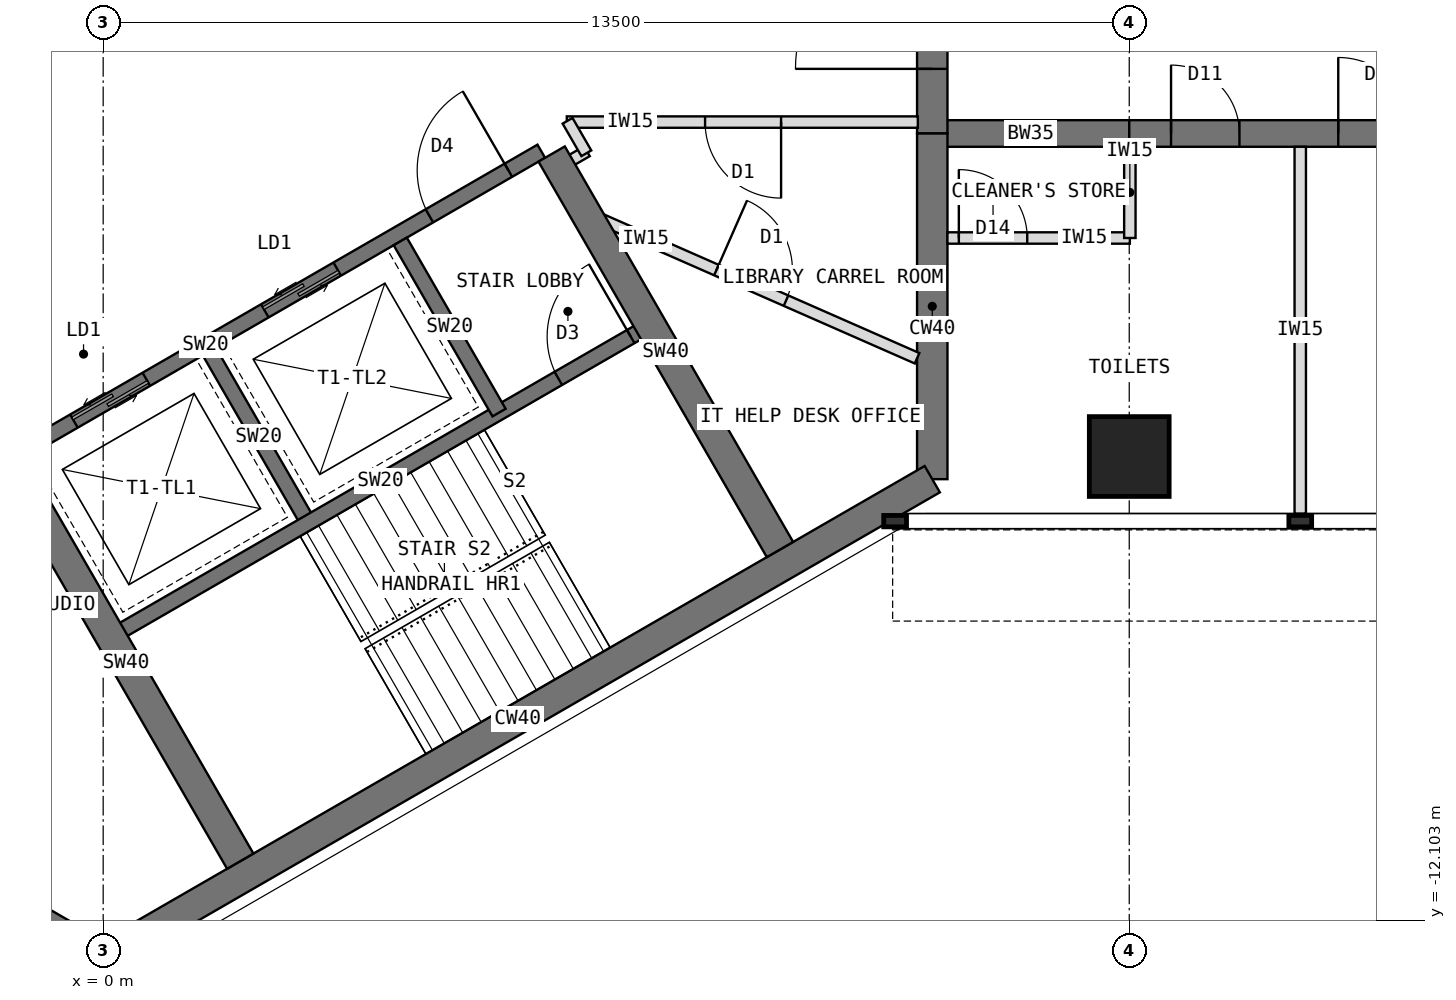
"""IFC4 building model, lengths in metres.
Left out: names, types, materials, properties, quantities, classifications, styles, units other than length and angle.
Written with IfcOpenShell. Run it as: python <this file> out.ifc"""

import sys

from ifc_helpers import new_model, si_unit, direction, frame, frame_2d, origin, origin_2d, place, context, subcontext, project, spatial, rectangle, extrude, element, fill, save


model = new_model("IFC4")
c1 = context("Model", 3, precision=1e-05, world=origin(), true_north=direction((0.0, 1.0)))
c2 = subcontext(c1, "Body", "Model", "MODEL_VIEW")
j1 = project(units=[si_unit("LENGTHUNIT", "METRE"), si_unit("PLANEANGLEUNIT", "RADIAN")], contexts=[c1])
p1 = place(None, origin())
s1 = spatial("IfcSite", under=j1, at=p1, CompositionType="ELEMENT")
p2 = place(p1, origin())
s2 = spatial("IfcBuilding", under=s1, at=p2, CompositionType="ELEMENT")
p3 = place(p2, frame((0.0, 0.0, 251.5)))
s3 = spatial("IfcBuildingStorey", under=s2, at=p3, CompositionType="ELEMENT", Elevation=251.5)
p4 = place(p3, frame((10.908, -6.298, 0.0), z_axis=(0.0, 0.0, 1.0), x_axis=(0.0, 1.0, 0.0)))
e1 = element("IfcWall", 1, at=p4, inside=s3, PredefinedType="SHEAR", context=c2, shape_type="SweptSolid", body=[
    extrude(rectangle(XDim=4.548, YDim=0.4, at=frame_2d((2.274, 0.0))), origin(), (0.0, 0.0, 1.0), 4.0),
])
p5 = place(p3, frame((10.908, -1.75, 0.0), z_axis=(0.0, 0.0, 1.0), x_axis=(0.0, 1.0, 0.0)))
e2 = element("IfcWall", 2, at=p5, inside=s3, PredefinedType="SHEAR", context=c2, shape_type="SweptSolid", body=[
    extrude(rectangle(XDim=3.5, YDim=0.4, at=frame_2d((1.75, 0.0))), origin(), (0.0, 0.0, 1.0), 4.0),
])
p6 = place(p5, frame((0.85, 0.0, 0.0)))
e3 = element("IfcOpeningElement", 3, at=p6, cuts=e2, PredefinedType="OPENING", context=c2, shape_type="SweptSolid", body=[
    extrude(rectangle(XDim=1.8, YDim=2.1, at=frame_2d((0.9, 1.05))), frame((0.0, 0.21, 0.0), z_axis=(0.0, -1.0, 0.0), x_axis=(1.0, 0.0, 0.0)), (0.0, 0.0, 1.0), 0.42),
])
p7 = place(p3, frame((-3.939, -10.322, 0.0), z_axis=(0.0, 0.0, 1.0), x_axis=(0.866011268655, -0.500024481964, 0.0)))
e4 = element("IfcWall", 4, at=p7, inside=s3, PredefinedType="SHEAR", context=c2, shape_type="SweptSolid", body=[
    extrude(rectangle(XDim=4.548, YDim=0.4, at=frame_2d((2.274, 0.0))), origin(), (0.0, 0.0, 1.0), 4.0),
])
p8 = place(p3, frame((0.0, -12.596, 0.0), z_axis=(0.0, 0.0, 1.0), x_axis=(0.866021940709, 0.500005998175, 0.0)))
e5 = element("IfcWall", 5, at=p8, inside=s3, PredefinedType="SHEAR", context=c2, shape_type="SweptSolid", body=[
    extrude(rectangle(XDim=12.596, YDim=0.4, at=frame_2d((6.298, 0.0))), origin(), (0.0, 0.0, 1.0), 4.0),
])
p9 = place(p3, frame((10.908, -1.75, 0.0), z_axis=(0.0, 0.0, 1.0), x_axis=(1.0, 0.0, 0.0)))
e6 = element("IfcWall", 6, at=p9, inside=s3, PredefinedType="SHEAR", context=c2, shape_type="SweptSolid", body=[
    extrude(rectangle(XDim=2.592, YDim=0.35, at=frame_2d((1.296, 0.0))), origin(), (0.0, 0.0, 1.0), 4.0),
])
p10 = place(p3, frame((13.5, -1.75, 0.0), z_axis=(0.0, 0.0, 1.0), x_axis=(1.0, 0.0, 0.0)))
e7 = element("IfcWall", 7, at=p10, inside=s3, PredefinedType="SHEAR", context=c2, shape_type="SweptSolid", body=[
    extrude(rectangle(XDim=13.2, YDim=0.35, at=frame_2d((6.6, 0.0))), origin(), (0.0, 0.0, 1.0), 4.0),
])
p11 = place(p10, frame((0.55, 0.0, 0.0)))
e8 = element("IfcOpeningElement", 8, at=p11, cuts=e7, PredefinedType="OPENING", context=c2, shape_type="SweptSolid", body=[
    extrude(rectangle(XDim=0.9, YDim=2.1, at=frame_2d((0.45, 1.05))), frame((0.0, 0.185, 0.0), z_axis=(0.0, -1.0, 0.0), x_axis=(1.0, 0.0, 0.0)), (0.0, 0.0, 1.0), 0.37),
])
p12 = place(p10, frame((2.75, 0.0, 0.0)))
e9 = element("IfcOpeningElement", 9, at=p12, cuts=e7, PredefinedType="OPENING", context=c2, shape_type="SweptSolid", body=[
    extrude(rectangle(XDim=1.0, YDim=2.1, at=frame_2d((0.5, 1.05))), frame((0.0, 0.185, 0.0), z_axis=(0.0, -1.0, 0.0), x_axis=(1.0, 0.0, 0.0)), (0.0, 0.0, 1.0), 0.37),
])
p13 = place(p10, frame((7.25, 0.0, 0.0)))
e10 = element("IfcOpeningElement", 10, at=p13, cuts=e7, PredefinedType="OPENING", context=c2, shape_type="SweptSolid", body=[
    extrude(rectangle(XDim=1.0, YDim=2.1, at=frame_2d((0.5, 1.05))), frame((0.0, 0.185, 0.0), z_axis=(0.0, -1.0, 0.0), x_axis=(1.0, 0.0, 0.0)), (0.0, 0.0, 1.0), 0.37),
])
p14 = place(p3, frame((13.5, -6.0, 0.0), z_axis=(0.0, 0.0, 1.0), x_axis=(1.0, 0.0, 0.0)))
e11 = element("IfcColumn", 11, at=p14, inside=s3, PredefinedType="COLUMN", context=c2, shape_type="SweptSolid", body=[
    extrude(rectangle(XDim=1.05, YDim=1.05, at=origin_2d()), origin(), (0.0, 0.0, 1.0), 4.0),
])
p15 = place(p3, frame((-1.164, -5.984, 0.0), z_axis=(0.0, 0.0, 1.0), x_axis=(0.866026010844, 0.49999894854, 0.0)))
e12 = element("IfcWall", 12, at=p15, inside=s3, PredefinedType="SHEAR", context=c2, shape_type="SweptSolid", body=[
    extrude(rectangle(XDim=8.0, YDim=0.2, at=frame_2d((4.0, 0.0))), origin(), (0.0, 0.0, 1.0), 4.0),
])
p16 = place(p15, frame((6.3, 0.0, 0.0)))
e13 = element("IfcOpeningElement", 13, at=p16, cuts=e12, PredefinedType="OPENING", context=c2, shape_type="SweptSolid", body=[
    extrude(rectangle(XDim=1.2, YDim=2.1, at=frame_2d((0.6, 1.05))), frame((0.0, 0.11, 0.0), z_axis=(0.0, -1.0, 0.0), x_axis=(1.0, 0.0, 0.0)), (0.0, 0.0, 1.0), 0.22),
])
p17 = place(p15, frame((0.9, 0.0, 0.0)))
e14 = element("IfcOpeningElement", 14, at=p17, cuts=e12, PredefinedType="OPENING", context=c2, shape_type="SweptSolid", body=[
    extrude(rectangle(XDim=1.1, YDim=2.2, at=frame_2d((0.55, 1.1))), frame((0.0, 0.11, 0.0), z_axis=(0.0, -1.0, 0.0), x_axis=(1.0, 0.0, 0.0)), (0.0, 0.0, 1.0), 0.22),
])
p18 = place(p15, frame((3.8, 0.0, 0.0)))
e15 = element("IfcOpeningElement", 15, at=p18, cuts=e12, PredefinedType="OPENING", context=c2, shape_type="SweptSolid", body=[
    extrude(rectangle(XDim=1.1, YDim=2.2, at=frame_2d((0.55, 1.1))), frame((0.0, 0.11, 0.0), z_axis=(0.0, -1.0, 0.0), x_axis=(1.0, 0.0, 0.0)), (0.0, 0.0, 1.0), 0.22),
])
p19 = place(p3, frame((1.397, -4.62, 0.0), z_axis=(0.0, 0.0, 1.0), x_axis=(0.499936506574, -0.866062058628, 0.0)))
e16 = element("IfcWall", 16, at=p19, inside=s3, PredefinedType="SHEAR", context=c2, shape_type="SweptSolid", body=[
    extrude(rectangle(XDim=2.6, YDim=0.2, at=frame_2d((1.3, 0.0))), origin(), (0.0, 0.0, 1.0), 4.0),
])
p20 = place(p3, frame((3.909, -3.17, 0.0), z_axis=(0.0, 0.0, 1.0), x_axis=(0.49997716683, -0.86603858612, 0.0)))
e17 = element("IfcWall", 17, at=p20, inside=s3, PredefinedType="SHEAR", context=c2, shape_type="SweptSolid", body=[
    extrude(rectangle(XDim=2.6, YDim=0.2, at=frame_2d((1.3, 0.0))), origin(), (0.0, 0.0, 1.0), 4.0),
])
p21 = place(p3, frame((0.186, -8.322, 0.0), z_axis=(0.0, 0.0, 1.0), x_axis=(0.866026010844, 0.49999894854, 0.0)))
e18 = element("IfcWall", 18, at=p21, inside=s3, PredefinedType="SHEAR", context=c2, shape_type="SweptSolid", body=[
    extrude(rectangle(XDim=8.0, YDim=0.2, at=frame_2d((4.0, 0.0))), origin(), (0.0, 0.0, 1.0), 4.0),
])
p22 = place(p21, frame((6.7, 0.0, 0.0)))
e19 = element("IfcOpeningElement", 19, at=p22, cuts=e18, PredefinedType="OPENING", context=c2, shape_type="SweptSolid", body=[
    extrude(rectangle(XDim=1.1, YDim=2.1, at=frame_2d((0.55, 1.05))), frame((0.0, 0.11, 0.0), z_axis=(0.0, -1.0, 0.0), x_axis=(1.0, 0.0, 0.0)), (0.0, 0.0, 1.0), 0.22),
])
for number, where, z_axis, x_axis in (
    (20, (5.901, -2.02, 0.0), (0.0, 0.0, 1.0), (0.5, -0.866, 0.0)),
    (21, (-1.201, -6.12, 0.0), (0.0, 0.0, 1.0), (0.5, -0.866, 0.0)),
):
    element("IfcWall", number, at=place(p3, frame(where, z_axis=z_axis, x_axis=x_axis)), inside=s3, PredefinedType="SHEAR", context=c2, shape_type="SweptSolid", body=[
        extrude(rectangle(XDim=6.008, YDim=0.4, at=frame_2d((3.004, 0.0))), origin(), (0.0, 0.0, 1.0), 4.0),
    ])
p23 = place(p3, frame((15.75, -1.925, 0.0), z_axis=(0.0, 0.0, 1.0), x_axis=(0.0, -1.0, 0.0)))
e22 = element("IfcWall", 22, at=p23, inside=s3, PredefinedType="PARTITIONING", context=c2, shape_type="SweptSolid", body=[
    extrude(rectangle(XDim=4.825, YDim=0.15, at=frame_2d((2.413, 0.0))), origin(), (0.0, 0.0, 1.0), 3.8),
])
p24 = place(p3, frame((11.108, -3.125, 0.0), z_axis=(0.0, 0.0, 1.0), x_axis=(1.0, 0.0, 0.0)))
e23 = element("IfcWall", 23, at=p24, inside=s3, PredefinedType="PARTITIONING", context=c2, shape_type="SweptSolid", body=[
    extrude(rectangle(XDim=2.4, YDim=0.15, at=frame_2d((1.2, 0.0))), origin(), (0.0, 0.0, 1.0), 3.8),
])
p25 = place(p24, frame((0.15, 0.0, 0.0)))
e24 = element("IfcOpeningElement", 24, at=p25, cuts=e23, PredefinedType="OPENING", context=c2, shape_type="SweptSolid", body=[
    extrude(rectangle(XDim=0.9, YDim=2.1, at=frame_2d((0.45, 1.05))), frame((0.0, 0.085, 0.0), z_axis=(0.0, -1.0, 0.0), x_axis=(1.0, 0.0, 0.0)), (0.0, 0.0, 1.0), 0.17),
])
p26 = place(p3, frame((13.508, -1.925, 0.0), z_axis=(0.0, 0.0, 1.0), x_axis=(0.0, -1.0, 0.0)))
e25 = element("IfcWall", 25, at=p26, inside=s3, PredefinedType="PARTITIONING", context=c2, shape_type="SweptSolid", body=[
    extrude(rectangle(XDim=1.2, YDim=0.15, at=frame_2d((0.6, 0.0))), origin(), (0.0, 0.0, 1.0), 3.267),
])
p27 = place(p3, frame((6.365, -1.983, 0.0), z_axis=(0.0, 0.0, 1.0), x_axis=(-0.865892400268, -0.500230298122, 0.0)))
e26 = element("IfcWall", 26, at=p27, inside=s3, PredefinedType="PARTITIONING", context=c2, shape_type="SweptSolid", body=[
    extrude(rectangle(XDim=0.43, YDim=0.15, at=frame_2d((0.215, 0.0))), origin(), (0.0, 0.0, 1.0), 3.8),
])
p28 = place(p3, frame((10.718, -1.6, 0.0), z_axis=(0.0, 0.0, 1.0), x_axis=(-1.0, 0.0, 0.0)))
e27 = element("IfcWall", 27, at=p28, inside=s3, PredefinedType="PARTITIONING", context=c2, shape_type="SweptSolid", body=[
    extrude(rectangle(XDim=4.618, YDim=0.15, at=frame_2d((2.309, 0.0))), origin(), (0.0, 0.0, 1.0), 3.8),
])
p29 = place(p28, frame((1.799, 0.0, 0.0)))
e28 = element("IfcOpeningElement", 28, at=p29, cuts=e27, PredefinedType="OPENING", context=c2, shape_type="SweptSolid", body=[
    extrude(rectangle(XDim=1.0, YDim=2.1, at=frame_2d((0.5, 1.05))), frame((0.0, 0.085, 0.0), z_axis=(0.0, -1.0, 0.0), x_axis=(1.0, 0.0, 0.0)), (0.0, 0.0, 1.0), 0.17),
])
p30 = place(p3, frame((6.11, -1.583, 0.0), z_axis=(0.0, 0.0, 1.0), x_axis=(0.50033519877, -0.865831790172, 0.0)))
e29 = element("IfcWall", 29, at=p30, inside=s3, PredefinedType="PARTITIONING", context=c2, shape_type="SweptSolid", body=[
    extrude(rectangle(XDim=0.494, YDim=0.15, at=frame_2d((0.247, 0.0))), origin(), (0.0, 0.0, 1.0), 3.8),
])
p31 = place(p3, frame((6.344, -2.789, 0.0), z_axis=(0.0, 0.0, 1.0), x_axis=(0.915438841787, -0.402457111937, 0.0)))
e30 = element("IfcWall", 30, at=p31, inside=s3, PredefinedType="PARTITIONING", context=c2, shape_type="SweptSolid", body=[
    extrude(rectangle(XDim=4.767, YDim=0.15, at=frame_2d((2.383, 0.0))), origin(), (0.0, 0.0, 1.0), 3.8),
])
p32 = place(p31, frame((1.883, 0.0, 0.0)))
e31 = element("IfcOpeningElement", 31, at=p32, cuts=e30, PredefinedType="OPENING", context=c2, shape_type="SweptSolid", body=[
    extrude(rectangle(XDim=1.0, YDim=2.1, at=frame_2d((0.5, 1.05))), frame((0.0, 0.085, 0.0), z_axis=(0.0, -1.0, 0.0), x_axis=(1.0, 0.0, 0.0)), (0.0, 0.0, 1.0), 0.17),
])
p33 = place(p16, origin())
e32 = element("IfcDoor", 32, at=p33, inside=s3, OperationType="SINGLE_SWING_RIGHT", PredefinedType="DOOR", context=c2, shape_type="SweptSolid", body=[
    extrude(rectangle(XDim=1.2, YDim=2.1, at=frame_2d((0.6, 1.05))), frame((0.0, 0.025, 0.0), z_axis=(0.0, -1.0, 0.0), x_axis=(1.0, 0.0, 0.0)), (0.0, 0.0, 1.0), 0.05),
])
fill(e13, e32)
p34 = place(p17, origin())
e33 = element("IfcDoor", 33, at=p34, inside=s3, OperationType="DOUBLE_DOOR_SLIDING", PredefinedType="DOOR", context=c2, shape_type="SweptSolid", body=[
    extrude(rectangle(XDim=1.1, YDim=2.2, at=frame_2d((0.55, 1.1))), frame((0.0, 0.025, 0.0), z_axis=(0.0, -1.0, 0.0), x_axis=(1.0, 0.0, 0.0)), (0.0, 0.0, 1.0), 0.05),
])
fill(e14, e33)
p35 = place(p18, origin())
e34 = element("IfcDoor", 34, at=p35, inside=s3, OperationType="DOUBLE_DOOR_SLIDING", PredefinedType="DOOR", context=c2, shape_type="SweptSolid", body=[
    extrude(rectangle(XDim=1.1, YDim=2.2, at=frame_2d((0.55, 1.1))), frame((0.0, 0.025, 0.0), z_axis=(0.0, -1.0, 0.0), x_axis=(1.0, 0.0, 0.0)), (0.0, 0.0, 1.0), 0.05),
])
fill(e15, e34)
p36 = place(p22, origin())
e35 = element("IfcDoor", 35, at=p36, inside=s3, OperationType="SINGLE_SWING_RIGHT", PredefinedType="DOOR", context=c2, shape_type="SweptSolid", body=[
    extrude(rectangle(XDim=1.1, YDim=2.1, at=frame_2d((0.55, 1.05))), frame((0.0, 0.025, 0.0), z_axis=(0.0, -1.0, 0.0), x_axis=(1.0, 0.0, 0.0)), (0.0, 0.0, 1.0), 0.05),
])
fill(e19, e35)
p37 = place(p6, origin())
e36 = element("IfcDoor", 36, at=p37, inside=s3, OperationType="DOUBLE_DOOR_DOUBLE_SWING", PredefinedType="DOOR", context=c2, shape_type="SweptSolid", body=[
    extrude(rectangle(XDim=1.8, YDim=2.1, at=frame_2d((0.9, 1.05))), frame((0.0, 0.025, 0.0), z_axis=(0.0, -1.0, 0.0), x_axis=(1.0, 0.0, 0.0)), (0.0, 0.0, 1.0), 0.05),
])
fill(e3, e36)
p38 = place(p25, origin())
e37 = element("IfcDoor", 37, at=p38, inside=s3, OperationType="SINGLE_SWING_LEFT", PredefinedType="DOOR", context=c2, shape_type="SweptSolid", body=[
    extrude(rectangle(XDim=0.9, YDim=2.1, at=frame_2d((0.45, 1.05))), frame((0.0, 0.025, 0.0), z_axis=(0.0, -1.0, 0.0), x_axis=(1.0, 0.0, 0.0)), (0.0, 0.0, 1.0), 0.05),
])
fill(e24, e37)
p39 = place(p29, origin())
e38 = element("IfcDoor", 38, at=p39, inside=s3, OperationType="SINGLE_SWING_LEFT", PredefinedType="DOOR", context=c2, shape_type="SweptSolid", body=[
    extrude(rectangle(XDim=1.0, YDim=2.1, at=frame_2d((0.5, 1.05))), frame((0.0, 0.025, 0.0), z_axis=(0.0, -1.0, 0.0), x_axis=(1.0, 0.0, 0.0)), (0.0, 0.0, 1.0), 0.05),
])
fill(e28, e38)
p40 = place(p32, origin())
e39 = element("IfcDoor", 39, at=p40, inside=s3, OperationType="SINGLE_SWING_LEFT", PredefinedType="DOOR", context=c2, shape_type="SweptSolid", body=[
    extrude(rectangle(XDim=1.0, YDim=2.1, at=frame_2d((0.5, 1.05))), frame((0.0, 0.025, 0.0), z_axis=(0.0, -1.0, 0.0), x_axis=(1.0, 0.0, 0.0)), (0.0, 0.0, 1.0), 0.05),
])
fill(e31, e39)
p41 = place(p11, origin())
e40 = element("IfcDoor", 40, at=p41, inside=s3, OperationType="SINGLE_SWING_LEFT", PredefinedType="DOOR", context=c2, shape_type="SweptSolid", body=[
    extrude(rectangle(XDim=0.9, YDim=2.1, at=frame_2d((0.45, 1.05))), frame((0.0, 0.025, 0.0), z_axis=(0.0, -1.0, 0.0), x_axis=(1.0, 0.0, 0.0)), (0.0, 0.0, 1.0), 0.05),
])
fill(e8, e40)
p42 = place(p12, origin())
e41 = element("IfcDoor", 41, at=p42, inside=s3, OperationType="SINGLE_SWING_LEFT", PredefinedType="DOOR", context=c2, shape_type="SweptSolid", body=[
    extrude(rectangle(XDim=1.0, YDim=2.1, at=frame_2d((0.5, 1.05))), frame((0.0, 0.025, 0.0), z_axis=(0.0, -1.0, 0.0), x_axis=(1.0, 0.0, 0.0)), (0.0, 0.0, 1.0), 0.05),
])
fill(e9, e41)
save(model, sys.argv[1])
